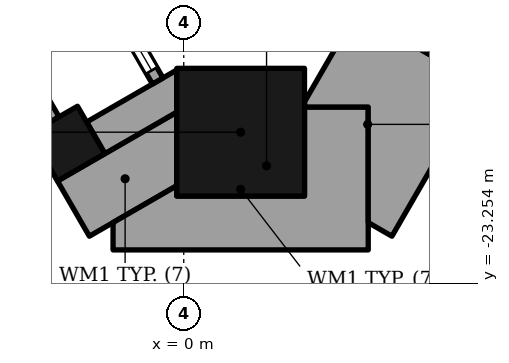
"""IFC4 building model, lengths in metres.
Left out: names, types, materials, properties, quantities, classifications, styles, units other than length and angle.
Written with IfcOpenShell. Run it as: python <this file> out.ifc"""

import sys

from ifc_helpers import new_model, si_unit, direction, frame, frame_2d, origin, origin_2d, place, context, subcontext, project, spatial, polyline, rectangle, outline, extrude, element, fill, save


model = new_model("IFC4")
c1 = context("Model", 3, precision=1e-05, world=origin(), true_north=direction((0.0, 1.0)))
c2 = subcontext(c1, "Body", "Model", "MODEL_VIEW")
j1 = project(units=[si_unit("LENGTHUNIT", "METRE"), si_unit("PLANEANGLEUNIT", "RADIAN")], contexts=[c1])
p1 = place(None, origin())
s1 = spatial("IfcSite", under=j1, at=p1, CompositionType="ELEMENT")
p2 = place(p1, origin())
s2 = spatial("IfcBuilding", under=s1, at=p2, CompositionType="ELEMENT")
p3 = place(p2, frame((0.0, 0.0, 287.2)))
s3 = spatial("IfcBuildingStorey", under=s2, at=p3, CompositionType="ELEMENT", Elevation=287.2)
p4 = place(p3, frame((0.936, -20.766, 0.0), z_axis=(0.0, 0.0, 1.0), x_axis=(0.0, 1.0, 0.0)))
e1 = element("IfcColumn", 1, at=p4, inside=s3, PredefinedType="COLUMN", context=c2, shape_type="SweptSolid", body=[
    extrude(rectangle(XDim=2.1, YDim=2.1, at=origin_2d()), origin(), (0.0, 0.0, 1.0), 3.9),
])
p5 = place(p3, frame((-1.912, -20.954, 0.0), z_axis=(0.0, 0.0, 1.0), x_axis=(0.500000015115, -0.866025395058, 0.0)))
e2 = element("IfcColumn", 2, at=p5, inside=s3, PredefinedType="COLUMN", context=c2, shape_type="SweptSolid", body=[
    extrude(rectangle(XDim=0.9, YDim=0.9, at=origin_2d()), origin(), (0.0, 0.0, 1.0), 3.9),
])
p6 = place(p3, origin())
e3 = element("IfcWall", 3, at=p6, inside=s3, PredefinedType="SOLIDWALL", context=c2, shape_type="SweptSolid", body=[
    extrude(outline(polyline([(-1.297, -21.119), (-0.114, -20.436), (-0.114, -19.743), (-1.597, -20.599), (-1.297, -21.119)])), origin(), (0.0, 0.0, 1.0), 3.0),
])
p7 = place(p3, frame((-3.937, -17.447, 0.0), z_axis=(0.0, 0.0, 1.0), x_axis=(0.499961193289, -0.866047807691, 0.0)))
e4 = element("IfcWall", 4, at=p7, inside=s3, PredefinedType="SOLIDWALL", context=c2, shape_type="SweptSolid", body=[
    extrude(rectangle(XDim=3.6, YDim=0.2, at=frame_2d((1.8, 0.0))), origin(), (0.0, 0.0, 1.0), 3.0),
])
p8 = place(p3, frame((-2.528, -16.287, 0.0), z_axis=(0.0, 0.0, 1.0), x_axis=(0.500027713859, -0.866009402589, 0.0)))
e5 = element("IfcWall", 5, at=p8, inside=s3, PredefinedType="ELEMENTEDWALL", context=c2, shape_type="SweptSolid", body=[
    extrude(rectangle(XDim=4.2, YDim=0.2, at=frame_2d((2.1, 0.0))), origin(), (0.0, 0.0, 1.0), 3.0),
])
p9 = place(p8, frame((0.2, 0.0, 0.45)))
e6 = element("IfcOpeningElement", 6, at=p9, cuts=e5, PredefinedType="OPENING", context=c2, shape_type="SweptSolid", body=[
    extrude(rectangle(XDim=2.4, YDim=2.25, at=frame_2d((1.2, 1.125))), frame((0.0, 0.11, 0.0), z_axis=(0.0, -1.0, 0.0), x_axis=(1.0, 0.0, 0.0)), (0.0, 0.0, 1.0), 0.22),
])
p10 = place(p8, frame((2.8, 0.0, 0.0)))
e7 = element("IfcOpeningElement", 7, at=p10, cuts=e5, PredefinedType="OPENING", context=c2, shape_type="SweptSolid", body=[
    extrude(rectangle(XDim=1.2, YDim=2.7, at=frame_2d((0.6, 1.35))), frame((0.0, 0.11, 0.0), z_axis=(0.0, -1.0, 0.0), x_axis=(1.0, 0.0, 0.0)), (0.0, 0.0, 1.0), 0.22),
])
p11 = place(p3, frame((2.684, -18.358, 0.0), z_axis=(0.0, 0.0, 1.0), x_axis=(0.866047807691, -0.499961193289, 0.0)))
e8 = element("IfcWall", 8, at=p11, inside=s3, PredefinedType="SOLIDWALL", context=c2, shape_type="SweptSolid", body=[
    extrude(rectangle(XDim=1.8, YDim=0.6, at=frame_2d((0.9, 0.0))), origin(), (0.0, 0.0, 1.0), 3.0),
])
p12 = place(p3, origin())
e9 = element("IfcWall", 9, at=p12, inside=s3, PredefinedType="SOLIDWALL", context=c2, shape_type="SweptSolid", body=[
    extrude(outline(polyline([(-0.114, -20.436), (-2.077, -21.569), (-1.552, -22.477), (-0.114, -21.646), (-0.114, -20.436)])), origin(), (0.0, 0.0, 1.0), 3.0),
])
p13 = place(p3, origin())
e10 = element("IfcWall", 10, at=p13, inside=s3, PredefinedType="SOLIDWALL", context=c2, shape_type="SweptSolid", body=[
    extrude(outline(polyline([(-0.114, -21.816), (-0.114, -21.646), (-1.163, -22.252), (-1.163, -22.702), (3.034, -22.702), (3.034, -20.352), (1.986, -20.352), (1.986, -21.816), (-0.114, -21.816)])), origin(), (0.0, 0.0, 1.0), 3.0),
])
p14 = place(p3, origin())
e11 = element("IfcWall", 11, at=p14, inside=s3, PredefinedType="SOLIDWALL", context=c2, shape_type="SweptSolid", body=[
    extrude(outline(polyline([(4.873, -19.968), (2.837, -18.793), (1.986, -20.268), (1.986, -20.352), (3.034, -20.352), (3.034, -22.252), (3.424, -22.477), (4.873, -19.968)])), origin(), (0.0, 0.0, 1.0), 3.0),
])
p15 = place(p10, origin())
e12 = element("IfcDoor", 12, at=p15, inside=s3, OperationType="SINGLE_SWING_LEFT", PredefinedType="DOOR", context=c2, shape_type="SweptSolid", body=[
    extrude(rectangle(XDim=1.2, YDim=2.7, at=frame_2d((0.6, 1.35))), frame((0.0, 0.025, 0.0), z_axis=(0.0, -1.0, 0.0), x_axis=(1.0, 0.0, 0.0)), (0.0, 0.0, 1.0), 0.05),
])
fill(e7, e12)
save(model, sys.argv[1])
